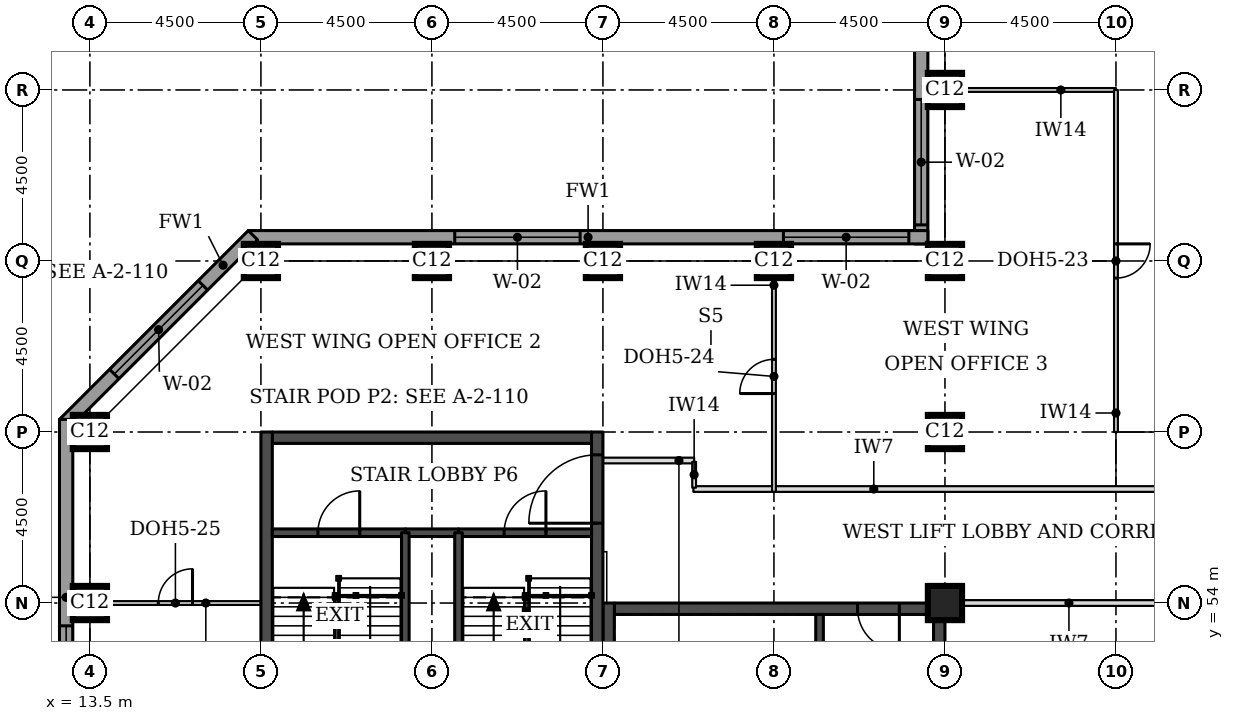
"""IFC4 building model, lengths in metres.
Left out: names, types, materials, properties, quantities, classifications, styles, units other than length and angle.
Written with IfcOpenShell. Run it as: python <this file> out.ifc"""

import sys

from ifc_helpers import new_model, si_unit, direction, frame, frame_2d, origin, origin_2d, place, context, subcontext, project, spatial, rectangle, extrude, element, fill, save


model = new_model("IFC4")
c1 = context("Model", 3, precision=1e-05, world=origin(), true_north=direction((0.0, 1.0)))
c2 = subcontext(c1, "Body", "Model", "MODEL_VIEW")
j1 = project(units=[si_unit("LENGTHUNIT", "METRE"), si_unit("PLANEANGLEUNIT", "RADIAN")], contexts=[c1])
p1 = place(None, origin())
s1 = spatial("IfcSite", under=j1, at=p1, CompositionType="ELEMENT")
p2 = place(p1, origin())
s2 = spatial("IfcBuilding", under=s1, at=p2, CompositionType="ELEMENT")
p3 = place(p2, frame((0.0, 0.0, 181.0)))
s3 = spatial("IfcBuildingStorey", under=s2, at=p3, CompositionType="ELEMENT", Elevation=181.0)
for number, where, z_axis, x_axis in (
    (1, (13.5, 54.0, 0.0), (0.0, 0.0, 1.0), (1.0, 0.0, 0.0)),
    (2, (36.0, 54.0, 0.0), (0.0, 0.0, 1.0), (1.0, 0.0, 0.0)),
    (3, (13.5, 58.5, 0.0), (0.0, 0.0, 1.0), (1.0, 0.0, 0.0)),
    (4, (36.0, 58.5, 0.0), (0.0, 0.0, 1.0), (1.0, 0.0, 0.0)),
    (5, (18.0, 63.0, 0.0), (0.0, 0.0, 1.0), (1.0, 0.0, 0.0)),
    (6, (22.5, 63.0, 0.0), (0.0, 0.0, 1.0), (1.0, 0.0, 0.0)),
    (7, (27.0, 63.0, 0.0), (0.0, 0.0, 1.0), (1.0, 0.0, 0.0)),
    (8, (31.5, 63.0, 0.0), (0.0, 0.0, 1.0), (1.0, 0.0, 0.0)),
    (9, (36.0, 63.0, 0.0), (0.0, 0.0, 1.0), (1.0, 0.0, 0.0)),
    (10, (36.0, 67.5, 0.0), (0.0, 0.0, 1.0), (1.0, 0.0, 0.0)),
):
    element("IfcColumn", number, at=place(p3, frame(where, z_axis=z_axis, x_axis=x_axis)), inside=s3, PredefinedType="COLUMN", context=c2, shape_type="SweptSolid", body=[
        extrude(rectangle(XDim=0.9, YDim=0.9, at=origin_2d()), origin(), (0.0, 0.0, 1.0), 3.7),
    ])
p4 = place(p3, frame((27.3, 53.85, 0.0), z_axis=(0.0, 0.0, 1.0), x_axis=(1.0, 0.0, 0.0)))
e11 = element("IfcWall", 11, at=p4, inside=s3, PredefinedType="SHEAR", context=c2, shape_type="SweptSolid", body=[
    extrude(rectangle(XDim=8.4, YDim=0.3, at=frame_2d((4.2, 0.0))), origin(), (0.0, 0.0, 1.0), 3.7),
])
p5 = place(p4, frame((6.4, 0.0, 0.0)))
e12 = element("IfcOpeningElement", 12, at=p5, cuts=e11, PredefinedType="OPENING", context=c2, shape_type="SweptSolid", body=[
    extrude(rectangle(XDim=1.1, YDim=2.1, at=frame_2d((0.55, 1.05))), frame((0.0, 0.16, 0.0), z_axis=(0.0, -1.0, 0.0), x_axis=(1.0, 0.0, 0.0)), (0.0, 0.0, 1.0), 0.32),
])
p6 = place(p3, frame((27.15, 45.0, 0.0), z_axis=(0.0, 0.0, 1.0), x_axis=(0.0, 1.0, 0.0)))
e13 = element("IfcWall", 13, at=p6, inside=s3, PredefinedType="SHEAR", context=c2, shape_type="SweptSolid", body=[
    extrude(rectangle(XDim=9.0, YDim=0.3, at=frame_2d((4.5, 0.0))), origin(), (0.0, 0.0, 1.0), 3.7),
])
p7 = place(p6, frame((0.4, 0.0, 0.0)))
e14 = element("IfcOpeningElement", 14, at=p7, cuts=e13, PredefinedType="OPENING", context=c2, shape_type="SweptSolid", body=[
    extrude(rectangle(XDim=1.1, YDim=2.1, at=frame_2d((0.55, 1.05))), frame((0.0, 0.16, 0.0), z_axis=(0.0, -1.0, 0.0), x_axis=(1.0, 0.0, 0.0)), (0.0, 0.0, 1.0), 0.32),
])
p8 = place(p3, frame((35.85, 45.0, 0.0), z_axis=(0.0, 0.0, 1.0), x_axis=(0.0, 1.0, 0.0)))
e15 = element("IfcWall", 15, at=p8, inside=s3, PredefinedType="SHEAR", context=c2, shape_type="SweptSolid", body=[
    extrude(rectangle(XDim=9.0, YDim=0.3, at=frame_2d((4.5, 0.0))), origin(), (0.0, 0.0, 1.0), 3.7),
])
p9 = place(p3, frame((18.3, 58.35, 0.0), z_axis=(0.0, 0.0, 1.0), x_axis=(1.0, 0.0, 0.0)))
e16 = element("IfcWall", 16, at=p9, inside=s3, PredefinedType="SHEAR", context=c2, shape_type="SweptSolid", body=[
    extrude(rectangle(XDim=8.4, YDim=0.3, at=frame_2d((4.2, 0.0))), origin(), (0.0, 0.0, 1.0), 3.7),
])
p10 = place(p3, frame((18.15, 49.5, 0.0), z_axis=(0.0, 0.0, 1.0), x_axis=(0.0, 1.0, 0.0)))
e17 = element("IfcWall", 17, at=p10, inside=s3, PredefinedType="SHEAR", context=c2, shape_type="SweptSolid", body=[
    extrude(rectangle(XDim=9.0, YDim=0.3, at=frame_2d((4.5, 0.0))), origin(), (0.0, 0.0, 1.0), 3.7),
])
p11 = place(p3, frame((26.85, 49.5, 0.0), z_axis=(0.0, 0.0, 1.0), x_axis=(0.0, 1.0, 0.0)))
e18 = element("IfcWall", 18, at=p11, inside=s3, PredefinedType="SHEAR", context=c2, shape_type="SweptSolid", body=[
    extrude(rectangle(XDim=9.0, YDim=0.3, at=frame_2d((4.5, 0.0))), origin(), (0.0, 0.0, 1.0), 3.7),
])
p12 = place(p11, frame((6.6, 0.0, 0.0)))
e19 = element("IfcOpeningElement", 19, at=p12, cuts=e18, PredefinedType="OPENING", context=c2, shape_type="SweptSolid", body=[
    extrude(rectangle(XDim=1.8, YDim=2.1, at=frame_2d((0.9, 1.05))), frame((0.0, 0.16, 0.0), z_axis=(0.0, -1.0, 0.0), x_axis=(1.0, 0.0, 0.0)), (0.0, 0.0, 1.0), 0.32),
])
p13 = place(p3, frame((35.375, 76.831, 0.0), z_axis=(0.0, 0.0, 1.0), x_axis=(0.0, -1.0, 0.0)))
e20 = element("IfcWall", 20, at=p13, inside=s3, PredefinedType="STANDARD", context=c2, shape_type="SweptSolid", body=[
    extrude(rectangle(XDim=13.381, YDim=0.35, at=frame_2d((6.691, 0.0))), origin(), (0.0, 0.0, 1.0), 3.525),
])
p14 = place(p13, frame((9.581, 0.0, 0.9)))
e21 = element("IfcOpeningElement", 21, at=p14, cuts=e20, PredefinedType="OPENING", context=c2, shape_type="SweptSolid", body=[
    extrude(rectangle(XDim=3.3, YDim=1.9, at=frame_2d((1.65, 0.95))), frame((0.0, 0.185, 0.0), z_axis=(0.0, -1.0, 0.0), x_axis=(1.0, 0.0, 0.0)), (0.0, 0.0, 1.0), 0.37),
])
p15 = place(p3, frame((35.55, 63.625, 0.0), z_axis=(0.0, 0.0, 1.0), x_axis=(-1.0, 0.0, 0.0)))
e22 = element("IfcWall", 22, at=p15, inside=s3, PredefinedType="STANDARD", context=c2, shape_type="SweptSolid", body=[
    extrude(rectangle(XDim=17.881, YDim=0.35, at=frame_2d((8.941, 0.0))), origin(), (0.0, 0.0, 1.0), 3.525),
])
p16 = place(p15, frame((0.5, 0.0, 0.9)))
e23 = element("IfcOpeningElement", 23, at=p16, cuts=e22, PredefinedType="OPENING", context=c2, shape_type="SweptSolid", body=[
    extrude(rectangle(XDim=3.3, YDim=1.9, at=frame_2d((1.65, 0.95))), frame((0.0, 0.185, 0.0), z_axis=(0.0, -1.0, 0.0), x_axis=(1.0, 0.0, 0.0)), (0.0, 0.0, 1.0), 0.37),
])
p17 = place(p15, frame((9.15, 0.0, 0.9)))
e24 = element("IfcOpeningElement", 24, at=p17, cuts=e22, PredefinedType="OPENING", context=c2, shape_type="SweptSolid", body=[
    extrude(rectangle(XDim=3.3, YDim=1.9, at=frame_2d((1.65, 0.95))), frame((0.0, 0.185, 0.0), z_axis=(0.0, -1.0, 0.0), x_axis=(1.0, 0.0, 0.0)), (0.0, 0.0, 1.0), 0.37),
])
p18 = place(p3, frame((17.792, 63.676, 0.0), z_axis=(0.0, 0.0, 1.0), x_axis=(-0.707106781187, -0.707106781187, 0.0)))
e25 = element("IfcWall", 25, at=p18, inside=s3, PredefinedType="STANDARD", context=c2, shape_type="SweptSolid", body=[
    extrude(rectangle(XDim=7.027, YDim=0.35, at=frame_2d((3.513, 0.0))), origin(), (0.0, 0.0, 1.0), 3.525),
])
p19 = place(p18, frame((1.863, 0.0, 0.9)))
e26 = element("IfcOpeningElement", 26, at=p19, cuts=e25, PredefinedType="OPENING", context=c2, shape_type="SweptSolid", body=[
    extrude(rectangle(XDim=3.3, YDim=1.9, at=frame_2d((1.65, 0.95))), frame((0.0, 0.185, 0.0), z_axis=(0.0, -1.0, 0.0), x_axis=(1.0, 0.0, 0.0)), (0.0, 0.0, 1.0), 0.37),
])
p20 = place(p3, frame((12.875, 58.831, 0.0), z_axis=(0.0, 0.0, 1.0), x_axis=(0.0, -1.0, 0.0)))
e27 = element("IfcWall", 27, at=p20, inside=s3, PredefinedType="STANDARD", context=c2, shape_type="SweptSolid", body=[
    extrude(rectangle(XDim=14.163, YDim=0.35, at=frame_2d((7.081, 0.0))), origin(), (0.0, 0.0, 1.0), 3.525),
])
p21 = place(p20, frame((5.431, 0.0, 0.9)))
e28 = element("IfcOpeningElement", 28, at=p21, cuts=e27, PredefinedType="OPENING", context=c2, shape_type="SweptSolid", body=[
    extrude(rectangle(XDim=3.3, YDim=1.9, at=frame_2d((1.65, 0.95))), frame((0.0, 0.185, 0.0), z_axis=(0.0, -1.0, 0.0), x_axis=(1.0, 0.0, 0.0)), (0.0, 0.0, 1.0), 0.37),
])
p22 = place(p3, frame((36.45, 54.0, 0.0), z_axis=(0.0, 0.0, 1.0), x_axis=(1.0, 0.0, 0.0)))
e29 = element("IfcWall", 29, at=p22, inside=s3, PredefinedType="PARTITIONING", context=c2, shape_type="SweptSolid", body=[
    extrude(rectangle(XDim=5.625, YDim=0.15, at=frame_2d((2.812, 0.0))), origin(), (0.0, 0.0, 1.0), 3.55),
])
p23 = place(p3, frame((29.38, 57.0, 0.0), z_axis=(0.0, 0.0, 1.0), x_axis=(1.0, 0.0, 0.0)))
e30 = element("IfcWall", 30, at=p23, inside=s3, PredefinedType="PARTITIONING", context=c2, shape_type="SweptSolid", body=[
    extrude(rectangle(XDim=12.695, YDim=0.15, at=frame_2d((6.348, 0.0))), origin(), (0.0, 0.0, 1.0), 3.55),
])
p24 = place(p3, frame((36.0, 67.5, 0.0), z_axis=(0.0, 0.0, 1.0), x_axis=(1.0, 0.0, 0.0)))
e31 = element("IfcWall", 31, at=p24, inside=s3, PredefinedType="PARTITIONING", context=c2, shape_type="SweptSolid", body=[
    extrude(rectangle(XDim=4.5, YDim=0.1, at=frame_2d((2.25, 0.0))), origin(), (0.0, 0.0, 1.0), 3.55),
])
p25 = place(p3, frame((40.5, 67.5, 0.0), z_axis=(0.0, 0.0, 1.0), x_axis=(0.0, -1.0, 0.0)))
e32 = element("IfcWall", 32, at=p25, inside=s3, PredefinedType="PARTITIONING", context=c2, shape_type="SweptSolid", body=[
    extrude(rectangle(XDim=9.0, YDim=0.1, at=frame_2d((4.5, 0.0))), origin(), (0.0, 0.0, 1.0), 3.55),
])
p26 = place(p25, frame((4.05, 0.0, 0.0)))
e33 = element("IfcOpeningElement", 33, at=p26, cuts=e32, PredefinedType="OPENING", context=c2, shape_type="SweptSolid", body=[
    extrude(rectangle(XDim=0.9, YDim=2.1, at=frame_2d((0.45, 1.05))), frame((0.0, 0.06, 0.0), z_axis=(0.0, -1.0, 0.0), x_axis=(1.0, 0.0, 0.0)), (0.0, 0.0, 1.0), 0.12),
])
p27 = place(p3, frame((31.5, 63.0, 0.0), z_axis=(0.0, 0.0, 1.0), x_axis=(0.0, -1.0, 0.0)))
e34 = element("IfcWall", 34, at=p27, inside=s3, PredefinedType="PARTITIONING", context=c2, shape_type="SweptSolid", body=[
    extrude(rectangle(XDim=6.075, YDim=0.1, at=frame_2d((3.038, 0.0))), origin(), (0.0, 0.0, 1.0), 3.55),
])
p28 = place(p27, frame((2.588, 0.0, 0.0)))
e35 = element("IfcOpeningElement", 35, at=p28, cuts=e34, PredefinedType="OPENING", context=c2, shape_type="SweptSolid", body=[
    extrude(rectangle(XDim=0.9, YDim=2.1, at=frame_2d((0.45, 1.05))), frame((0.0, 0.06, 0.0), z_axis=(0.0, -1.0, 0.0), x_axis=(1.0, 0.0, 0.0)), (0.0, 0.0, 1.0), 0.12),
])
p29 = place(p3, frame((13.5, 54.0, 0.0), z_axis=(0.0, 0.0, 1.0), x_axis=(1.0, 0.0, 0.0)))
e36 = element("IfcWall", 36, at=p29, inside=s3, PredefinedType="PARTITIONING", context=c2, shape_type="SweptSolid", body=[
    extrude(rectangle(XDim=4.5, YDim=0.1, at=frame_2d((2.25, 0.0))), origin(), (0.0, 0.0, 1.0), 3.55),
])
p30 = place(p29, frame((1.8, 0.0, 0.0)))
e37 = element("IfcOpeningElement", 37, at=p30, cuts=e36, PredefinedType="OPENING", context=c2, shape_type="SweptSolid", body=[
    extrude(rectangle(XDim=0.9, YDim=2.1, at=frame_2d((0.45, 1.05))), frame((0.0, 0.06, 0.0), z_axis=(0.0, -1.0, 0.0), x_axis=(1.0, 0.0, 0.0)), (0.0, 0.0, 1.0), 0.12),
])
p31 = place(p3, frame((27.0, 57.75, 0.0), z_axis=(0.0, 0.0, 1.0), x_axis=(1.0, 0.0, 0.0)))
e38 = element("IfcWall", 38, at=p31, inside=s3, PredefinedType="PARTITIONING", context=c2, shape_type="SweptSolid", body=[
    extrude(rectangle(XDim=2.4, YDim=0.15, at=frame_2d((1.2, 0.0))), origin(), (0.0, 0.0, 1.0), 3.55),
])
p32 = place(p3, frame((29.4, 57.715, 0.0), z_axis=(0.0, 0.0, 1.0), x_axis=(0.0, -1.0, 0.0)))
e39 = element("IfcWall", 39, at=p32, inside=s3, PredefinedType="PARTITIONING", context=c2, shape_type="SweptSolid", body=[
    extrude(rectangle(XDim=0.68, YDim=0.1, at=frame_2d((0.34, 0.0))), origin(), (0.0, 0.0, 1.0), 3.55),
])
p33 = place(p3, frame((32.7, 48.0, 0.0), z_axis=(0.0, 0.0, 1.0), x_axis=(0.0, 1.0, 0.0)))
e40 = element("IfcWall", 40, at=p33, inside=s3, PredefinedType="SOLIDWALL", context=c2, shape_type="SweptSolid", body=[
    extrude(rectangle(XDim=5.7, YDim=0.2, at=frame_2d((2.85, 0.0))), origin(), (0.0, 0.0, 1.0), 3.55),
])
p34 = place(p3, frame((21.8, 55.85, 0.0), z_axis=(0.0, 0.0, 1.0), x_axis=(1.0, 0.0, 0.0)))
e41 = element("IfcWall", 41, at=p34, inside=s3, PredefinedType="SOLIDWALL", context=c2, shape_type="SweptSolid", body=[
    extrude(rectangle(XDim=1.4, YDim=0.2, at=frame_2d((0.7, 0.0))), origin(), (0.0, 0.0, 1.0), 3.55),
])
p35 = place(p3, frame((18.3, 55.85, 0.0), z_axis=(0.0, 0.0, 1.0), x_axis=(1.0, 0.0, 0.0)))
e42 = element("IfcWall", 42, at=p35, inside=s3, PredefinedType="SOLIDWALL", context=c2, shape_type="SweptSolid", body=[
    extrude(rectangle(XDim=3.5, YDim=0.2, at=frame_2d((1.75, 0.0))), origin(), (0.0, 0.0, 1.0), 3.55),
])
p36 = place(p35, frame((1.2, 0.0, 0.0)))
e43 = element("IfcOpeningElement", 43, at=p36, cuts=e42, PredefinedType="OPENING", context=c2, shape_type="SweptSolid", body=[
    extrude(rectangle(XDim=1.1, YDim=2.1, at=frame_2d((0.55, 1.05))), frame((0.0, 0.11, 0.0), z_axis=(0.0, -1.0, 0.0), x_axis=(1.0, 0.0, 0.0)), (0.0, 0.0, 1.0), 0.22),
])
p37 = place(p3, frame((23.2, 55.85, 0.0), z_axis=(0.0, 0.0, 1.0), x_axis=(1.0, 0.0, 0.0)))
e44 = element("IfcWall", 44, at=p37, inside=s3, PredefinedType="SOLIDWALL", context=c2, shape_type="SweptSolid", body=[
    extrude(rectangle(XDim=3.5, YDim=0.2, at=frame_2d((1.75, 0.0))), origin(), (0.0, 0.0, 1.0), 3.55),
])
p38 = place(p37, frame((1.2, 0.0, 0.0)))
e45 = element("IfcOpeningElement", 45, at=p38, cuts=e44, PredefinedType="OPENING", context=c2, shape_type="SweptSolid", body=[
    extrude(rectangle(XDim=1.1, YDim=2.1, at=frame_2d((0.55, 1.05))), frame((0.0, 0.11, 0.0), z_axis=(0.0, -1.0, 0.0), x_axis=(1.0, 0.0, 0.0)), (0.0, 0.0, 1.0), 0.22),
])
for number, where, z_axis, x_axis in (
    (46, (21.8, 49.8, 0.0), (0.0, 0.0, 1.0), (0.0, 1.0, 0.0)),
    (47, (23.2, 49.8, 0.0), (0.0, 0.0, 1.0), (0.0, 1.0, 0.0)),
):
    element("IfcWall", number, at=place(p3, frame(where, z_axis=z_axis, x_axis=x_axis)), inside=s3, PredefinedType="SOLIDWALL", context=c2, shape_type="SweptSolid", body=[
        extrude(rectangle(XDim=6.05, YDim=0.2, at=frame_2d((3.025, 0.0))), origin(), (0.0, 0.0, 1.0), 3.55),
    ])
p39 = place(p14, origin())
e48 = element("IfcWindow", 48, at=p39, inside=s3, PartitioningType="SINGLE_PANEL", PredefinedType="WINDOW", context=c2, shape_type="SweptSolid", body=[
    extrude(rectangle(XDim=3.3, YDim=1.9, at=frame_2d((1.65, 0.95))), frame((0.0, 0.085, 0.0), z_axis=(0.0, -1.0, 0.0), x_axis=(1.0, 0.0, 0.0)), (0.0, 0.0, 1.0), 0.06),
])
fill(e21, e48)
p40 = place(p16, origin())
e49 = element("IfcWindow", 49, at=p40, inside=s3, PartitioningType="SINGLE_PANEL", PredefinedType="WINDOW", context=c2, shape_type="SweptSolid", body=[
    extrude(rectangle(XDim=3.3, YDim=1.9, at=frame_2d((1.65, 0.95))), frame((0.0, 0.085, 0.0), z_axis=(0.0, -1.0, 0.0), x_axis=(1.0, 0.0, 0.0)), (0.0, 0.0, 1.0), 0.06),
])
fill(e23, e49)
p41 = place(p17, origin())
e50 = element("IfcWindow", 50, at=p41, inside=s3, PartitioningType="SINGLE_PANEL", PredefinedType="WINDOW", context=c2, shape_type="SweptSolid", body=[
    extrude(rectangle(XDim=3.3, YDim=1.9, at=frame_2d((1.65, 0.95))), frame((0.0, 0.085, 0.0), z_axis=(0.0, -1.0, 0.0), x_axis=(1.0, 0.0, 0.0)), (0.0, 0.0, 1.0), 0.06),
])
fill(e24, e50)
p42 = place(p19, origin())
e51 = element("IfcWindow", 51, at=p42, inside=s3, PartitioningType="SINGLE_PANEL", PredefinedType="WINDOW", context=c2, shape_type="SweptSolid", body=[
    extrude(rectangle(XDim=3.3, YDim=1.9, at=frame_2d((1.65, 0.95))), frame((0.0, 0.085, 0.0), z_axis=(0.0, -1.0, 0.0), x_axis=(1.0, 0.0, 0.0)), (0.0, 0.0, 1.0), 0.06),
])
fill(e26, e51)
p43 = place(p21, origin())
e52 = element("IfcWindow", 52, at=p43, inside=s3, PartitioningType="SINGLE_PANEL", PredefinedType="WINDOW", context=c2, shape_type="SweptSolid", body=[
    extrude(rectangle(XDim=3.3, YDim=1.9, at=frame_2d((1.65, 0.95))), frame((0.0, 0.085, 0.0), z_axis=(0.0, -1.0, 0.0), x_axis=(1.0, 0.0, 0.0)), (0.0, 0.0, 1.0), 0.06),
])
fill(e28, e52)
p44 = place(p26, origin())
e53 = element("IfcDoor", 53, at=p44, inside=s3, OperationType="SINGLE_SWING_LEFT", PredefinedType="DOOR", context=c2, shape_type="SweptSolid", body=[
    extrude(rectangle(XDim=0.9, YDim=2.1, at=frame_2d((0.45, 1.05))), frame((0.0, 0.025, 0.0), z_axis=(0.0, -1.0, 0.0), x_axis=(1.0, 0.0, 0.0)), (0.0, 0.0, 1.0), 0.05),
])
fill(e33, e53)
p45 = place(p28, frame((0.9, 0.0, 0.0), z_axis=(0.0, 0.0, 1.0), x_axis=(-1.0, 0.0, 0.0)))
e54 = element("IfcDoor", 54, at=p45, inside=s3, OperationType="SINGLE_SWING_LEFT", PredefinedType="DOOR", context=c2, shape_type="SweptSolid", body=[
    extrude(rectangle(XDim=0.9, YDim=2.1, at=frame_2d((0.45, 1.05))), frame((0.0, 0.025, 0.0), z_axis=(0.0, -1.0, 0.0), x_axis=(1.0, 0.0, 0.0)), (0.0, 0.0, 1.0), 0.05),
])
fill(e35, e54)
p46 = place(p30, origin())
e55 = element("IfcDoor", 55, at=p46, inside=s3, OperationType="SINGLE_SWING_RIGHT", PredefinedType="DOOR", context=c2, shape_type="SweptSolid", body=[
    extrude(rectangle(XDim=0.9, YDim=2.1, at=frame_2d((0.45, 1.05))), frame((0.0, 0.025, 0.0), z_axis=(0.0, -1.0, 0.0), x_axis=(1.0, 0.0, 0.0)), (0.0, 0.0, 1.0), 0.05),
])
fill(e37, e55)
p47 = place(p5, frame((1.1, 0.0, 0.0), z_axis=(0.0, 0.0, 1.0), x_axis=(-1.0, 0.0, 0.0)))
e56 = element("IfcDoor", 56, at=p47, inside=s3, OperationType="SINGLE_SWING_LEFT", PredefinedType="DOOR", context=c2, shape_type="SweptSolid", body=[
    extrude(rectangle(XDim=1.1, YDim=2.1, at=frame_2d((0.55, 1.05))), frame((0.0, 0.025, 0.0), z_axis=(0.0, -1.0, 0.0), x_axis=(1.0, 0.0, 0.0)), (0.0, 0.0, 1.0), 0.05),
])
fill(e12, e56)
p48 = place(p36, origin())
e57 = element("IfcDoor", 57, at=p48, inside=s3, OperationType="SINGLE_SWING_RIGHT", PredefinedType="DOOR", context=c2, shape_type="SweptSolid", body=[
    extrude(rectangle(XDim=1.1, YDim=2.1, at=frame_2d((0.55, 1.05))), frame((0.0, 0.025, 0.0), z_axis=(0.0, -1.0, 0.0), x_axis=(1.0, 0.0, 0.0)), (0.0, 0.0, 1.0), 0.05),
])
fill(e43, e57)
p49 = place(p38, origin())
e58 = element("IfcDoor", 58, at=p49, inside=s3, OperationType="SINGLE_SWING_RIGHT", PredefinedType="DOOR", context=c2, shape_type="SweptSolid", body=[
    extrude(rectangle(XDim=1.1, YDim=2.1, at=frame_2d((0.55, 1.05))), frame((0.0, 0.025, 0.0), z_axis=(0.0, -1.0, 0.0), x_axis=(1.0, 0.0, 0.0)), (0.0, 0.0, 1.0), 0.05),
])
fill(e45, e58)
p50 = place(p12, origin())
e59 = element("IfcDoor", 59, at=p50, inside=s3, OperationType="SINGLE_SWING_LEFT", PredefinedType="DOOR", context=c2, shape_type="SweptSolid", body=[
    extrude(rectangle(XDim=1.8, YDim=2.1, at=frame_2d((0.9, 1.05))), frame((0.0, 0.025, 0.0), z_axis=(0.0, -1.0, 0.0), x_axis=(1.0, 0.0, 0.0)), (0.0, 0.0, 1.0), 0.05),
])
fill(e19, e59)
save(model, sys.argv[1])
